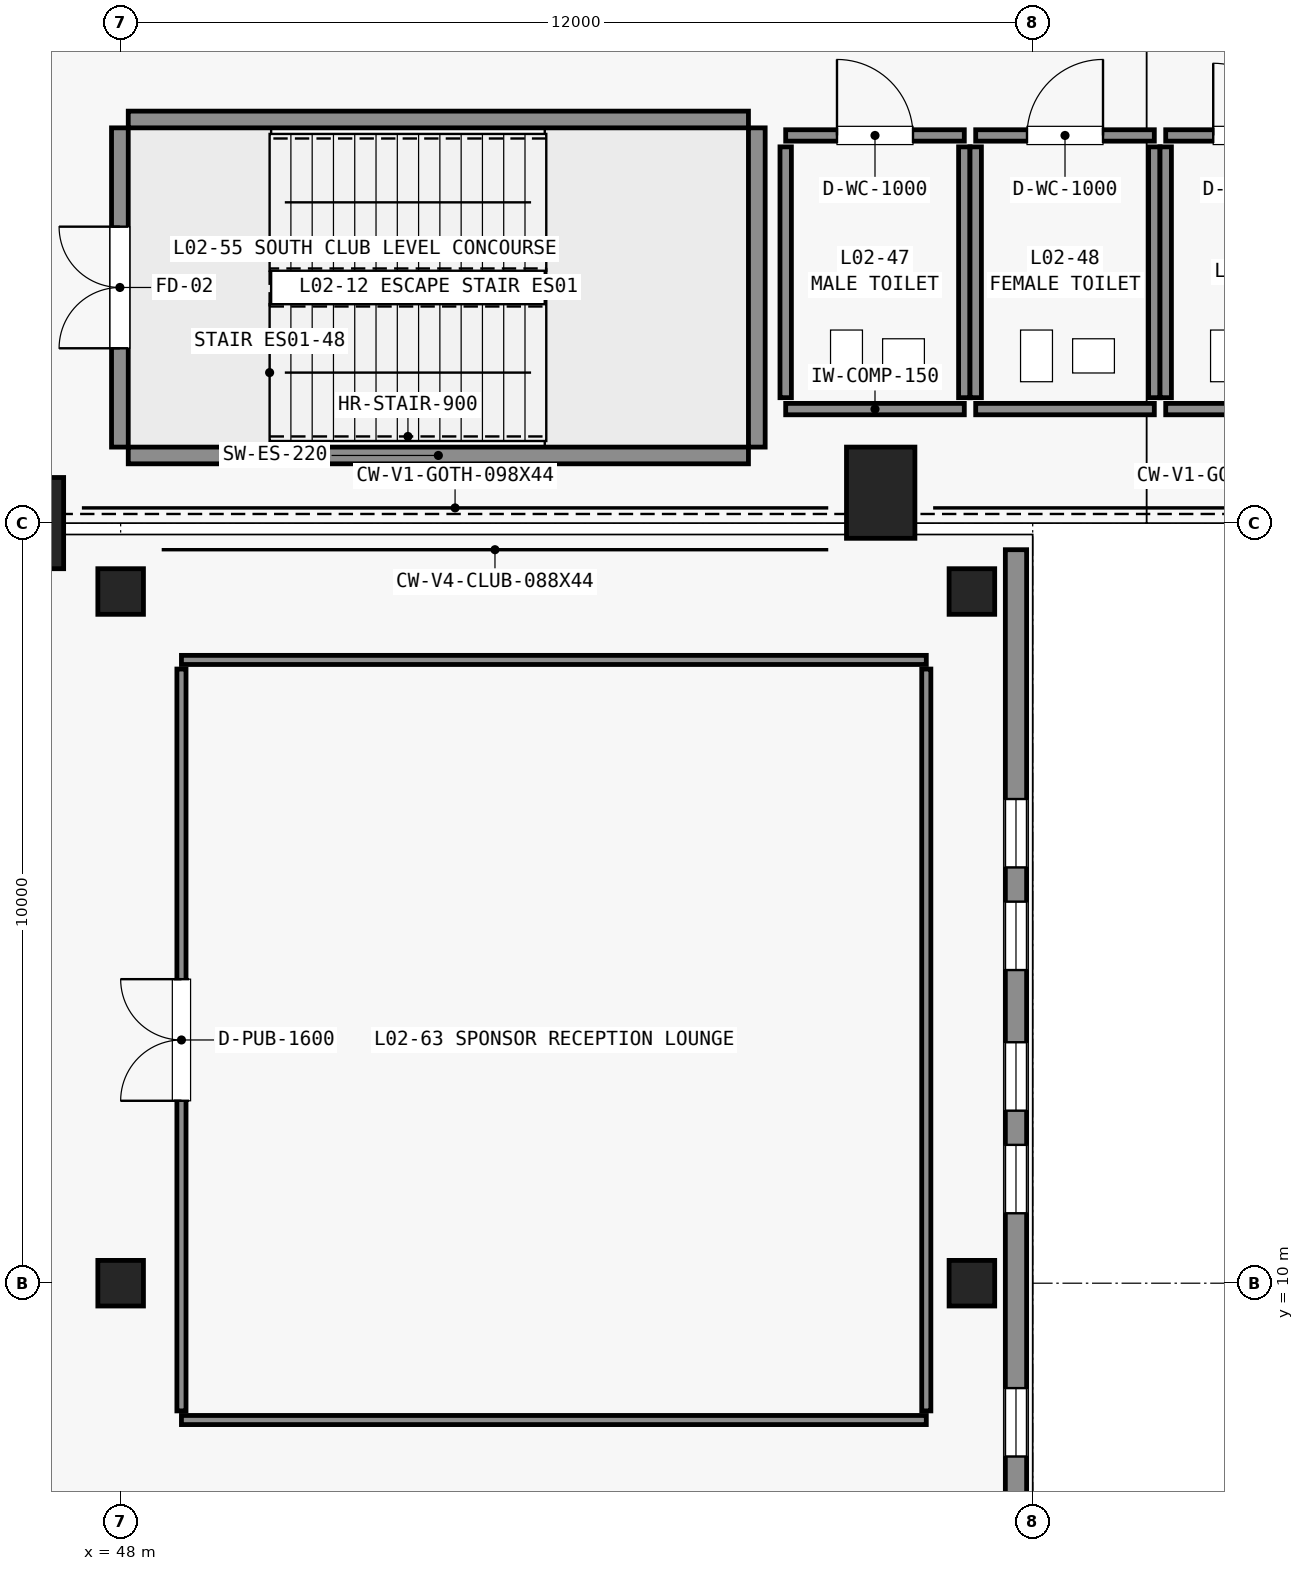
"""IFC4 building model, lengths in metres.
Left out: names, types, materials, properties, quantities, classifications, styles, units other than length and angle.
Written with IfcOpenShell. Run it as: python <this file> out.ifc"""

import sys

from ifc_helpers import new_model, si_unit, direction, frame, frame_2d, origin, origin_2d, place, context, subcontext, project, spatial, rectangle, extrude, element, fill, save


model = new_model("IFC4")
c1 = context("Model", 3, precision=1e-05, world=origin(), true_north=direction((0.0, 1.0)))
c2 = subcontext(c1, "Body", "Model", "MODEL_VIEW")
j1 = project(units=[si_unit("LENGTHUNIT", "METRE"), si_unit("PLANEANGLEUNIT", "RADIAN")], contexts=[c1])
p1 = place(None, origin())
s1 = spatial("IfcSite", under=j1, at=p1, CompositionType="ELEMENT")
p2 = place(p1, origin())
s2 = spatial("IfcBuilding", under=s1, at=p2, CompositionType="ELEMENT")
p3 = place(p2, frame((0.0, 0.0, 11.4)))
s3 = spatial("IfcBuildingStorey", under=s2, at=p3, CompositionType="ELEMENT", Elevation=11.4)
for number, where, z_axis, x_axis in (
    (1, (58.0, 20.4, 0.0), (0.0, 0.0, 1.0), (1.0, 0.0, 0.0)),
    (2, (46.8, 20.0, 0.0), (0.0, 0.0, 1.0), (1.0, 0.0, 0.0)),
):
    element("IfcColumn", number, at=place(p3, frame(where, z_axis=z_axis, x_axis=x_axis)), inside=s3, PredefinedType="PILASTER", context=c2, shape_type="SweptSolid", body=[
        extrude(rectangle(XDim=0.9, YDim=1.2, at=origin_2d()), origin(), (0.0, 0.0, 1.0), 4.8),
    ])
for number, where, z_axis, x_axis in (
    (3, (48.0, 10.0, 0.0), (0.0, 0.0, 1.0), (1.0, 0.0, 0.0)),
    (4, (48.0, 19.1, 0.0), (0.0, 0.0, 1.0), (1.0, 0.0, 0.0)),
    (5, (59.2, 10.0, 0.0), (0.0, 0.0, 1.0), (1.0, 0.0, 0.0)),
    (6, (59.2, 19.1, 0.0), (0.0, 0.0, 1.0), (1.0, 0.0, 0.0)),
):
    element("IfcColumn", number, at=place(p3, frame(where, z_axis=z_axis, x_axis=x_axis)), inside=s3, PredefinedType="COLUMN", context=c2, shape_type="SweptSolid", body=[
        extrude(rectangle(XDim=0.6, YDim=0.6, at=origin_2d()), origin(), (0.0, 0.0, 1.0), 4.44),
    ])
p4 = place(p3, frame((59.78, 0.22, 0.0), z_axis=(0.0, 0.0, 1.0), x_axis=(0.0, 1.0, 0.0)))
e7 = element("IfcWall", 7, at=p4, inside=s3, PredefinedType="STANDARD", context=c2, shape_type="SweptSolid", body=[
    extrude(rectangle(XDim=19.43, YDim=0.28, at=frame_2d((9.715, 0.0))), origin(), (0.0, 0.0, 1.0), 4.45),
])
p5 = place(p4, frame((2.45, 0.0, 0.95)))
e8 = element("IfcOpeningElement", 8, at=p5, cuts=e7, PredefinedType="OPENING", context=c2, shape_type="SweptSolid", body=[
    extrude(rectangle(XDim=0.9, YDim=2.85, at=frame_2d((0.45, 1.425))), frame((0.0, 0.15, 0.0), z_axis=(0.0, -1.0, 0.0), x_axis=(1.0, 0.0, 0.0)), (0.0, 0.0, 1.0), 0.3),
])
p6 = place(p4, frame((4.3, 0.0, 0.95)))
e9 = element("IfcOpeningElement", 9, at=p6, cuts=e7, PredefinedType="OPENING", context=c2, shape_type="SweptSolid", body=[
    extrude(rectangle(XDim=0.9, YDim=2.85, at=frame_2d((0.45, 1.425))), frame((0.0, 0.15, 0.0), z_axis=(0.0, -1.0, 0.0), x_axis=(1.0, 0.0, 0.0)), (0.0, 0.0, 1.0), 0.3),
])
p7 = place(p4, frame((5.65, 0.0, 0.95)))
e10 = element("IfcOpeningElement", 10, at=p7, cuts=e7, PredefinedType="OPENING", context=c2, shape_type="SweptSolid", body=[
    extrude(rectangle(XDim=0.9, YDim=2.85, at=frame_2d((0.45, 1.425))), frame((0.0, 0.15, 0.0), z_axis=(0.0, -1.0, 0.0), x_axis=(1.0, 0.0, 0.0)), (0.0, 0.0, 1.0), 0.3),
])
p8 = place(p4, frame((7.5, 0.0, 0.95)))
e11 = element("IfcOpeningElement", 11, at=p8, cuts=e7, PredefinedType="OPENING", context=c2, shape_type="SweptSolid", body=[
    extrude(rectangle(XDim=0.9, YDim=2.85, at=frame_2d((0.45, 1.425))), frame((0.0, 0.15, 0.0), z_axis=(0.0, -1.0, 0.0), x_axis=(1.0, 0.0, 0.0)), (0.0, 0.0, 1.0), 0.3),
])
p9 = place(p4, frame((10.7, 0.0, 0.95)))
e12 = element("IfcOpeningElement", 12, at=p9, cuts=e7, PredefinedType="OPENING", context=c2, shape_type="SweptSolid", body=[
    extrude(rectangle(XDim=0.9, YDim=2.85, at=frame_2d((0.45, 1.425))), frame((0.0, 0.15, 0.0), z_axis=(0.0, -1.0, 0.0), x_axis=(1.0, 0.0, 0.0)), (0.0, 0.0, 1.0), 0.3),
])
p10 = place(p4, frame((12.05, 0.0, 0.95)))
e13 = element("IfcOpeningElement", 13, at=p10, cuts=e7, PredefinedType="OPENING", context=c2, shape_type="SweptSolid", body=[
    extrude(rectangle(XDim=0.9, YDim=2.85, at=frame_2d((0.45, 1.425))), frame((0.0, 0.15, 0.0), z_axis=(0.0, -1.0, 0.0), x_axis=(1.0, 0.0, 0.0)), (0.0, 0.0, 1.0), 0.3),
])
p11 = place(p4, frame((13.9, 0.0, 0.95)))
e14 = element("IfcOpeningElement", 14, at=p11, cuts=e7, PredefinedType="OPENING", context=c2, shape_type="SweptSolid", body=[
    extrude(rectangle(XDim=0.9, YDim=2.85, at=frame_2d((0.45, 1.425))), frame((0.0, 0.15, 0.0), z_axis=(0.0, -1.0, 0.0), x_axis=(1.0, 0.0, 0.0)), (0.0, 0.0, 1.0), 0.3),
])
p12 = place(p4, frame((15.25, 0.0, 0.95)))
e15 = element("IfcOpeningElement", 15, at=p12, cuts=e7, PredefinedType="OPENING", context=c2, shape_type="SweptSolid", body=[
    extrude(rectangle(XDim=0.9, YDim=2.85, at=frame_2d((0.45, 1.425))), frame((0.0, 0.15, 0.0), z_axis=(0.0, -1.0, 0.0), x_axis=(1.0, 0.0, 0.0)), (0.0, 0.0, 1.0), 0.3),
])
for number, where, z_axis, x_axis in (
    (16, (48.1, 20.89, 0.0), (0.0, 0.0, 1.0), (1.0, 0.0, 0.0)),
    (17, (48.1, 25.31, 0.0), (0.0, 0.0, 1.0), (1.0, 0.0, 0.0)),
):
    element("IfcWall", number, at=place(p3, frame(where, z_axis=z_axis, x_axis=x_axis)), inside=s3, PredefinedType="SHEAR", context=c2, shape_type="SweptSolid", body=[
        extrude(rectangle(XDim=8.16, YDim=0.22, at=frame_2d((4.08, 0.0))), origin(), (0.0, 0.0, 1.0), 4.8),
    ])
p13 = place(p3, frame((47.99, 21.0, 0.0), z_axis=(0.0, 0.0, 1.0), x_axis=(0.0, 1.0, 0.0)))
e18 = element("IfcWall", 18, at=p13, inside=s3, PredefinedType="SHEAR", context=c2, shape_type="SweptSolid", body=[
    extrude(rectangle(XDim=4.2, YDim=0.22, at=frame_2d((2.1, 0.0))), origin(), (0.0, 0.0, 1.0), 4.8),
])
p14 = place(p13, frame((1.3, 0.0, 0.0)))
e19 = element("IfcOpeningElement", 19, at=p14, cuts=e18, PredefinedType="OPENING", context=c2, shape_type="SweptSolid", body=[
    extrude(rectangle(XDim=1.6, YDim=2.2, at=frame_2d((0.8, 1.1))), frame((0.0, 0.12, 0.0), z_axis=(0.0, -1.0, 0.0), x_axis=(1.0, 0.0, 0.0)), (0.0, 0.0, 1.0), 0.24),
])
p15 = place(p3, frame((56.37, 21.0, 0.0), z_axis=(0.0, 0.0, 1.0), x_axis=(0.0, 1.0, 0.0)))
e20 = element("IfcWall", 20, at=p15, inside=s3, PredefinedType="SHEAR", context=c2, shape_type="SweptSolid", body=[
    extrude(rectangle(XDim=4.2, YDim=0.22, at=frame_2d((2.1, 0.0))), origin(), (0.0, 0.0, 1.0), 4.8),
])
p16 = place(p3, frame((56.75, 21.5, 0.0), z_axis=(0.0, 0.0, 1.0), x_axis=(1.0, 0.0, 0.0)))
e21 = element("IfcWall", 21, at=p16, inside=s3, PredefinedType="STANDARD", context=c2, shape_type="SweptSolid", body=[
    extrude(rectangle(XDim=2.35, YDim=0.15, at=frame_2d((1.175, 0.0))), origin(), (0.0, 0.0, 1.0), 4.45),
])
p17 = place(p3, frame((56.75, 25.1, 0.0), z_axis=(0.0, 0.0, 1.0), x_axis=(1.0, 0.0, 0.0)))
e22 = element("IfcWall", 22, at=p17, inside=s3, PredefinedType="STANDARD", context=c2, shape_type="SweptSolid", body=[
    extrude(rectangle(XDim=2.35, YDim=0.15, at=frame_2d((1.175, 0.0))), origin(), (0.0, 0.0, 1.0), 4.45),
])
p18 = place(p17, frame((0.675, 0.0, 0.0)))
e23 = element("IfcOpeningElement", 23, at=p18, cuts=e22, PredefinedType="OPENING", context=c2, shape_type="SweptSolid", body=[
    extrude(rectangle(XDim=1.0, YDim=2.15, at=frame_2d((0.5, 1.075))), frame((0.0, 0.085, 0.0), z_axis=(0.0, -1.0, 0.0), x_axis=(1.0, 0.0, 0.0)), (0.0, 0.0, 1.0), 0.17),
])
for number, where, z_axis, x_axis in (
    (24, (56.75, 21.65, 0.0), (0.0, 0.0, 1.0), (0.0, 1.0, 0.0)),
    (25, (59.1, 21.65, 0.0), (0.0, 0.0, 1.0), (0.0, 1.0, 0.0)),
):
    element("IfcWall", number, at=place(p3, frame(where, z_axis=z_axis, x_axis=x_axis)), inside=s3, PredefinedType="STANDARD", context=c2, shape_type="SweptSolid", body=[
        extrude(rectangle(XDim=3.3, YDim=0.15, at=frame_2d((1.65, 0.0))), origin(), (0.0, 0.0, 1.0), 4.45),
    ])
p19 = place(p3, frame((59.25, 21.5, 0.0), z_axis=(0.0, 0.0, 1.0), x_axis=(1.0, 0.0, 0.0)))
e26 = element("IfcWall", 26, at=p19, inside=s3, PredefinedType="STANDARD", context=c2, shape_type="SweptSolid", body=[
    extrude(rectangle(XDim=2.35, YDim=0.15, at=frame_2d((1.175, 0.0))), origin(), (0.0, 0.0, 1.0), 4.45),
])
p20 = place(p3, frame((59.25, 25.1, 0.0), z_axis=(0.0, 0.0, 1.0), x_axis=(1.0, 0.0, 0.0)))
e27 = element("IfcWall", 27, at=p20, inside=s3, PredefinedType="STANDARD", context=c2, shape_type="SweptSolid", body=[
    extrude(rectangle(XDim=2.35, YDim=0.15, at=frame_2d((1.175, 0.0))), origin(), (0.0, 0.0, 1.0), 4.45),
])
p21 = place(p20, frame((0.675, 0.0, 0.0)))
e28 = element("IfcOpeningElement", 28, at=p21, cuts=e27, PredefinedType="OPENING", context=c2, shape_type="SweptSolid", body=[
    extrude(rectangle(XDim=1.0, YDim=2.15, at=frame_2d((0.5, 1.075))), frame((0.0, 0.085, 0.0), z_axis=(0.0, -1.0, 0.0), x_axis=(1.0, 0.0, 0.0)), (0.0, 0.0, 1.0), 0.17),
])
for number, where, z_axis, x_axis in (
    (29, (59.25, 21.65, 0.0), (0.0, 0.0, 1.0), (0.0, 1.0, 0.0)),
    (30, (61.6, 21.65, 0.0), (0.0, 0.0, 1.0), (0.0, 1.0, 0.0)),
):
    element("IfcWall", number, at=place(p3, frame(where, z_axis=z_axis, x_axis=x_axis)), inside=s3, PredefinedType="STANDARD", context=c2, shape_type="SweptSolid", body=[
        extrude(rectangle(XDim=3.3, YDim=0.15, at=frame_2d((1.65, 0.0))), origin(), (0.0, 0.0, 1.0), 4.45),
    ])
p22 = place(p3, frame((61.75, 21.5, 0.0), z_axis=(0.0, 0.0, 1.0), x_axis=(1.0, 0.0, 0.0)))
e31 = element("IfcWall", 31, at=p22, inside=s3, PredefinedType="STANDARD", context=c2, shape_type="SweptSolid", body=[
    extrude(rectangle(XDim=2.2, YDim=0.15, at=frame_2d((1.1, 0.0))), origin(), (0.0, 0.0, 1.0), 4.45),
])
p23 = place(p3, frame((61.75, 25.1, 0.0), z_axis=(0.0, 0.0, 1.0), x_axis=(1.0, 0.0, 0.0)))
e32 = element("IfcWall", 32, at=p23, inside=s3, PredefinedType="STANDARD", context=c2, shape_type="SweptSolid", body=[
    extrude(rectangle(XDim=2.2, YDim=0.15, at=frame_2d((1.1, 0.0))), origin(), (0.0, 0.0, 1.0), 4.45),
])
p24 = place(p23, frame((0.625, 0.0, 0.0)))
e33 = element("IfcOpeningElement", 33, at=p24, cuts=e32, PredefinedType="OPENING", context=c2, shape_type="SweptSolid", body=[
    extrude(rectangle(XDim=0.95, YDim=2.15, at=frame_2d((0.475, 1.075))), frame((0.0, 0.085, 0.0), z_axis=(0.0, -1.0, 0.0), x_axis=(1.0, 0.0, 0.0)), (0.0, 0.0, 1.0), 0.17),
])
p25 = place(p3, frame((61.75, 21.65, 0.0), z_axis=(0.0, 0.0, 1.0), x_axis=(0.0, 1.0, 0.0)))
e34 = element("IfcWall", 34, at=p25, inside=s3, PredefinedType="STANDARD", context=c2, shape_type="SweptSolid", body=[
    extrude(rectangle(XDim=3.3, YDim=0.15, at=frame_2d((1.65, 0.0))), origin(), (0.0, 0.0, 1.0), 4.45),
])
for number, where, z_axis, x_axis in (
    (35, (48.8, 8.2, 0.0), (0.0, 0.0, 1.0), (1.0, 0.0, 0.0)),
    (36, (48.8, 18.2, 0.0), (0.0, 0.0, 1.0), (1.0, 0.0, 0.0)),
):
    element("IfcWall", number, at=place(p3, frame(where, z_axis=z_axis, x_axis=x_axis)), inside=s3, PredefinedType="PARTITIONING", context=c2, shape_type="SweptSolid", body=[
        extrude(rectangle(XDim=9.8, YDim=0.12, at=frame_2d((4.9, 0.0))), origin(), (0.0, 0.0, 1.0), 4.45),
    ])
p26 = place(p3, frame((48.8, 8.32, 0.0), z_axis=(0.0, 0.0, 1.0), x_axis=(0.0, 1.0, 0.0)))
e37 = element("IfcWall", 37, at=p26, inside=s3, PredefinedType="PARTITIONING", context=c2, shape_type="SweptSolid", body=[
    extrude(rectangle(XDim=9.76, YDim=0.12, at=frame_2d((4.88, 0.0))), origin(), (0.0, 0.0, 1.0), 4.45),
])
p27 = place(p26, frame((4.08, 0.0, 0.0)))
e38 = element("IfcOpeningElement", 38, at=p27, cuts=e37, PredefinedType="OPENING", context=c2, shape_type="SweptSolid", body=[
    extrude(rectangle(XDim=1.6, YDim=2.25, at=frame_2d((0.8, 1.125))), frame((0.0, 0.07, 0.0), z_axis=(0.0, -1.0, 0.0), x_axis=(1.0, 0.0, 0.0)), (0.0, 0.0, 1.0), 0.14),
])
p28 = place(p3, frame((58.6, 8.32, 0.0), z_axis=(0.0, 0.0, 1.0), x_axis=(0.0, 1.0, 0.0)))
e39 = element("IfcWall", 39, at=p28, inside=s3, PredefinedType="PARTITIONING", context=c2, shape_type="SweptSolid", body=[
    extrude(rectangle(XDim=9.76, YDim=0.12, at=frame_2d((4.88, 0.0))), origin(), (0.0, 0.0, 1.0), 4.45),
])
p29 = place(p8, origin())
e40 = element("IfcWindow", 40, at=p29, inside=s3, PartitioningType="DOUBLE_PANEL_VERTICAL", PredefinedType="WINDOW", context=c2, shape_type="SweptSolid", body=[
    extrude(rectangle(XDim=0.9, YDim=2.85, at=frame_2d((0.45, 1.425))), frame((0.0, 0.03, 0.0), z_axis=(0.0, -1.0, 0.0), x_axis=(1.0, 0.0, 0.0)), (0.0, 0.0, 1.0), 0.06),
])
fill(e11, e40)
p30 = place(p9, origin())
e41 = element("IfcWindow", 41, at=p30, inside=s3, PartitioningType="DOUBLE_PANEL_VERTICAL", PredefinedType="WINDOW", context=c2, shape_type="SweptSolid", body=[
    extrude(rectangle(XDim=0.9, YDim=2.85, at=frame_2d((0.45, 1.425))), frame((0.0, 0.03, 0.0), z_axis=(0.0, -1.0, 0.0), x_axis=(1.0, 0.0, 0.0)), (0.0, 0.0, 1.0), 0.06),
])
fill(e12, e41)
p31 = place(p10, origin())
e42 = element("IfcWindow", 42, at=p31, inside=s3, PartitioningType="DOUBLE_PANEL_VERTICAL", PredefinedType="WINDOW", context=c2, shape_type="SweptSolid", body=[
    extrude(rectangle(XDim=0.9, YDim=2.85, at=frame_2d((0.45, 1.425))), frame((0.0, 0.03, 0.0), z_axis=(0.0, -1.0, 0.0), x_axis=(1.0, 0.0, 0.0)), (0.0, 0.0, 1.0), 0.06),
])
fill(e13, e42)
p32 = place(p11, origin())
e43 = element("IfcWindow", 43, at=p32, inside=s3, PartitioningType="DOUBLE_PANEL_VERTICAL", PredefinedType="WINDOW", context=c2, shape_type="SweptSolid", body=[
    extrude(rectangle(XDim=0.9, YDim=2.85, at=frame_2d((0.45, 1.425))), frame((0.0, 0.03, 0.0), z_axis=(0.0, -1.0, 0.0), x_axis=(1.0, 0.0, 0.0)), (0.0, 0.0, 1.0), 0.06),
])
fill(e14, e43)
p33 = place(p12, origin())
e44 = element("IfcWindow", 44, at=p33, inside=s3, PartitioningType="DOUBLE_PANEL_VERTICAL", PredefinedType="WINDOW", context=c2, shape_type="SweptSolid", body=[
    extrude(rectangle(XDim=0.9, YDim=2.85, at=frame_2d((0.45, 1.425))), frame((0.0, 0.03, 0.0), z_axis=(0.0, -1.0, 0.0), x_axis=(1.0, 0.0, 0.0)), (0.0, 0.0, 1.0), 0.06),
])
fill(e15, e44)
p34 = place(p14, origin())
e45 = element("IfcDoor", 45, at=p34, inside=s3, OperationType="DOUBLE_DOOR_SINGLE_SWING", PredefinedType="DOOR", context=c2, shape_type="SweptSolid", body=[
    extrude(rectangle(XDim=1.6, YDim=2.2, at=frame_2d((0.8, 1.1))), frame((0.0, 0.025, 0.0), z_axis=(0.0, -1.0, 0.0), x_axis=(1.0, 0.0, 0.0)), (0.0, 0.0, 1.0), 0.05),
])
fill(e19, e45)
p35 = place(p18, origin())
e46 = element("IfcDoor", 46, at=p35, inside=s3, OperationType="SINGLE_SWING_LEFT", PredefinedType="DOOR", context=c2, shape_type="SweptSolid", body=[
    extrude(rectangle(XDim=1.0, YDim=2.15, at=frame_2d((0.5, 1.075))), frame((0.0, 0.025, 0.0), z_axis=(0.0, -1.0, 0.0), x_axis=(1.0, 0.0, 0.0)), (0.0, 0.0, 1.0), 0.05),
])
fill(e23, e46)
p36 = place(p21, origin())
e47 = element("IfcDoor", 47, at=p36, inside=s3, OperationType="SINGLE_SWING_RIGHT", PredefinedType="DOOR", context=c2, shape_type="SweptSolid", body=[
    extrude(rectangle(XDim=1.0, YDim=2.15, at=frame_2d((0.5, 1.075))), frame((0.0, 0.025, 0.0), z_axis=(0.0, -1.0, 0.0), x_axis=(1.0, 0.0, 0.0)), (0.0, 0.0, 1.0), 0.05),
])
fill(e28, e47)
p37 = place(p24, origin())
e48 = element("IfcDoor", 48, at=p37, inside=s3, OperationType="SINGLE_SWING_LEFT", PredefinedType="DOOR", context=c2, shape_type="SweptSolid", body=[
    extrude(rectangle(XDim=0.95, YDim=2.15, at=frame_2d((0.475, 1.075))), frame((0.0, 0.025, 0.0), z_axis=(0.0, -1.0, 0.0), x_axis=(1.0, 0.0, 0.0)), (0.0, 0.0, 1.0), 0.05),
])
fill(e33, e48)
p38 = place(p27, origin())
e49 = element("IfcDoor", 49, at=p38, inside=s3, OperationType="DOUBLE_DOOR_SINGLE_SWING", PredefinedType="DOOR", context=c2, shape_type="SweptSolid", body=[
    extrude(rectangle(XDim=1.6, YDim=2.25, at=frame_2d((0.8, 1.125))), frame((0.0, 0.025, 0.0), z_axis=(0.0, -1.0, 0.0), x_axis=(1.0, 0.0, 0.0)), (0.0, 0.0, 1.0), 0.05),
])
fill(e38, e49)
save(model, sys.argv[1])
